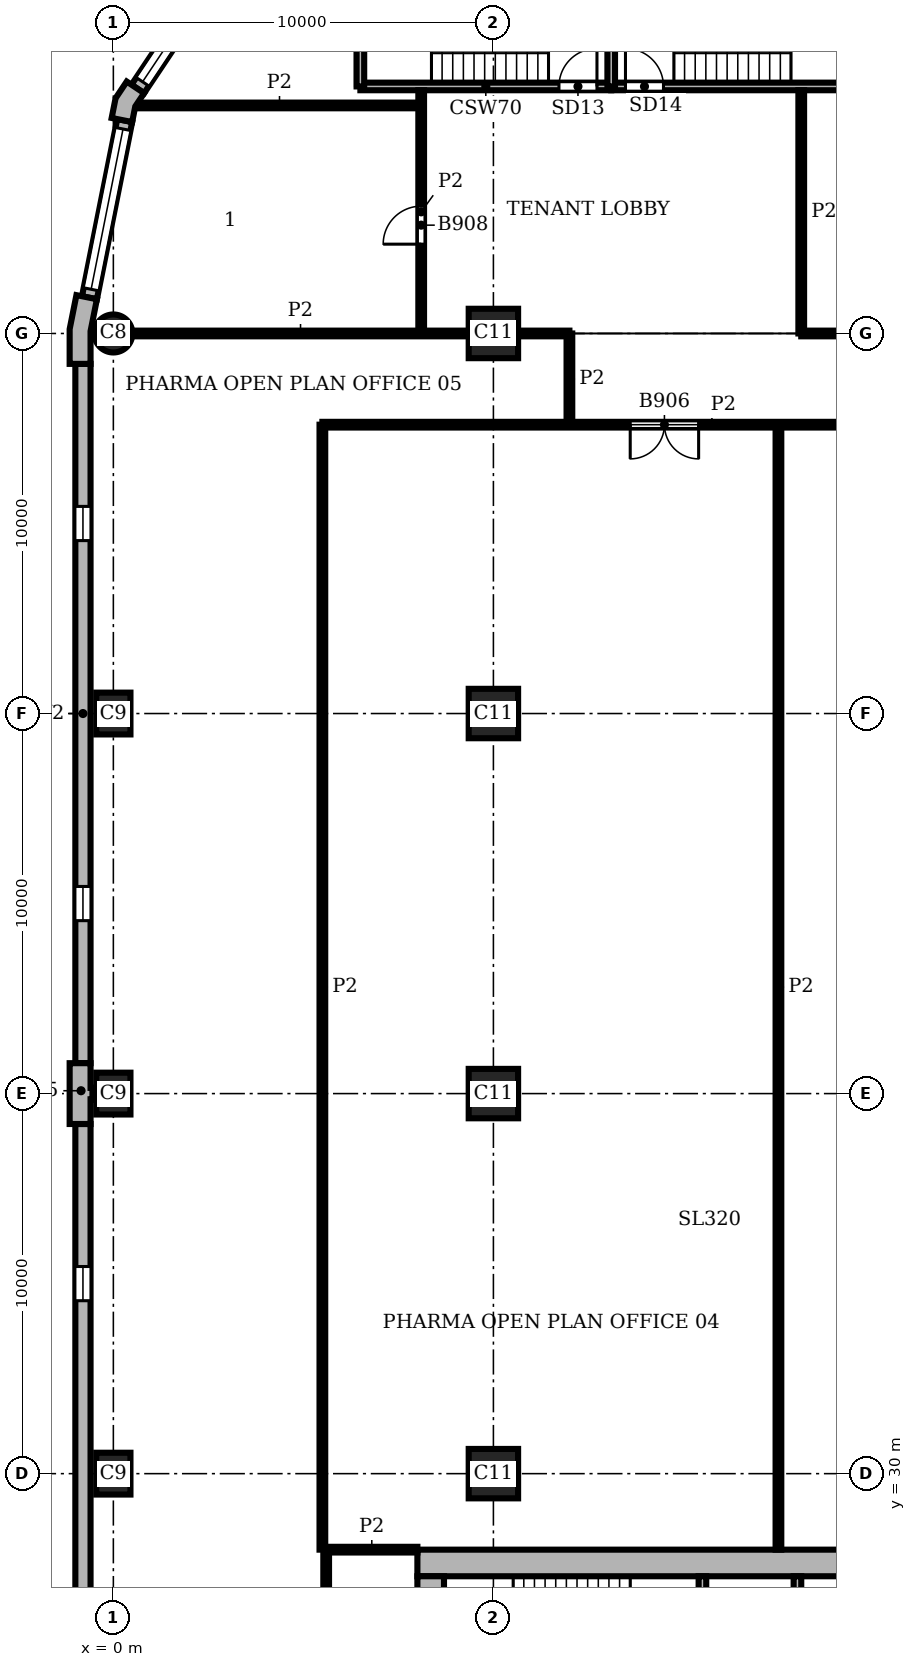
"""IFC4 building model, lengths in metres.
Left out: names, types, materials, properties, quantities, classifications, styles, units other than length and angle.
Written with IfcOpenShell. Run it as: python <this file> out.ifc"""

import sys

from ifc_helpers import new_model, si_unit, direction, frame, frame_2d, origin, origin_2d, place, context, subcontext, project, spatial, polyline, rectangle, circle, outline, extrude, element, fill, save


model = new_model("IFC4")
c1 = context("Model", 3, precision=1e-05, world=origin(), true_north=direction((0.0, 1.0)))
c2 = subcontext(c1, "Body", "Model", "MODEL_VIEW")
j1 = project(units=[si_unit("LENGTHUNIT", "METRE"), si_unit("PLANEANGLEUNIT", "RADIAN")], contexts=[c1])
p1 = place(None, origin())
s1 = spatial("IfcSite", under=j1, at=p1, CompositionType="ELEMENT")
p2 = place(p1, origin())
s2 = spatial("IfcBuilding", under=s1, at=p2, CompositionType="ELEMENT")
p3 = place(p2, frame((0.0, 0.0, 233.1)))
s3 = spatial("IfcBuildingStorey", under=s2, at=p3, CompositionType="ELEMENT", Elevation=233.1)
p4 = place(p3, frame((0.0, 60.0, 0.0), z_axis=(0.0, 0.0, 1.0), x_axis=(1.0, 0.0, 0.0)))
e1 = element("IfcColumn", 1, at=p4, inside=s3, PredefinedType="COLUMN", context=c2, shape_type="SweptSolid", body=[
    extrude(circle(Radius=0.5, at=origin_2d()), origin(), (0.0, 0.0, 1.0), 3.9),
])
for number, where, z_axis, x_axis in (
    (2, (0.0, 50.0, 0.0), (0.0, 0.0, 1.0), (0.0, 1.0, 0.0)),
    (3, (0.0, 40.0, 0.0), (0.0, 0.0, 1.0), (0.0, 1.0, 0.0)),
    (4, (0.0, 30.0, 0.0), (0.0, 0.0, 1.0), (0.0, 1.0, 0.0)),
):
    element("IfcColumn", number, at=place(p3, frame(where, z_axis=z_axis, x_axis=x_axis)), inside=s3, PredefinedType="COLUMN", context=c2, shape_type="SweptSolid", body=[
        extrude(rectangle(XDim=1.1, YDim=0.9, at=origin_2d()), origin(), (0.0, 0.0, 1.0), 3.9),
    ])
for number, where, z_axis, x_axis in (
    (5, (10.0, 30.0, 0.0), (0.0, 0.0, 1.0), (1.0, 0.0, 0.0)),
    (6, (10.0, 40.0, 0.0), (0.0, 0.0, 1.0), (1.0, 0.0, 0.0)),
    (7, (10.0, 50.0, 0.0), (0.0, 0.0, 1.0), (1.0, 0.0, 0.0)),
    (8, (10.0, 60.0, 0.0), (0.0, 0.0, 1.0), (1.0, 0.0, 0.0)),
):
    element("IfcColumn", number, at=place(p3, frame(where, z_axis=z_axis, x_axis=x_axis)), inside=s3, PredefinedType="COLUMN", context=c2, shape_type="SweptSolid", body=[
        extrude(rectangle(XDim=1.3, YDim=1.3, at=origin_2d()), origin(), (0.0, 0.0, 1.0), 3.9),
    ])
p5 = place(p3, frame((28.0, 27.65, 0.0), z_axis=(0.0, 0.0, 1.0), x_axis=(-1.0, 0.0, 0.0)))
e9 = element("IfcWall", 9, at=p5, inside=s3, PredefinedType="SHEAR", context=c2, shape_type="SweptSolid", body=[
    extrude(rectangle(XDim=20.0, YDim=0.7, at=frame_2d((10.0, 0.0))), origin(), (0.0, 0.0, 1.0), 3.9),
])
p6 = place(p3, frame((8.35, 27.3, 0.0), z_axis=(0.0, 0.0, 1.0), x_axis=(0.0, -1.0, 0.0)))
e10 = element("IfcWall", 10, at=p6, inside=s3, PredefinedType="SHEAR", context=c2, shape_type="SweptSolid", body=[
    extrude(rectangle(XDim=18.6, YDim=0.7, at=frame_2d((9.3, 0.0))), origin(), (0.0, 0.0, 1.0), 3.9),
])
p7 = place(p3, origin())
e11 = element("IfcWall", 11, at=p7, inside=s3, PredefinedType="SOLIDWALL", context=c2, shape_type="SweptSolid", body=[
    extrude(outline(polyline([(0.477, 66.545), (0.352, 66.629), (0.059, 66.189), (-0.045, 65.67), (0.103, 65.641), (0.495, 65.563), (0.577, 65.974), (0.81, 66.323), (0.477, 66.545)])), origin(), (0.0, 0.0, 1.0), 3.9),
])
e12 = element("IfcWall", 12, at=p7, inside=s3, PredefinedType="SOLIDWALL", context=c2, shape_type="SweptSolid", body=[
    extrude(outline(polyline([(-0.825, 60.98), (-0.972, 61.009), (-1.15, 60.113), (-1.15, 59.2), (-1.0, 59.2), (-0.6, 59.2), (-0.6, 60.059), (-0.432, 60.902), (-0.825, 60.98)])), origin(), (0.0, 0.0, 1.0), 3.9),
])
e13 = element("IfcWall", 13, at=p7, inside=s3, PredefinedType="SOLIDWALL", context=c2, shape_type="SweptSolid", body=[
    extrude(outline(polyline([(-0.6, 39.2), (-0.6, 39.85), (-0.55, 39.85), (-0.55, 40.15), (-0.6, 40.15), (-0.6, 40.8), (-1.0, 40.8), (-1.15, 40.8), (-1.15, 40.0), (-1.15, 39.2), (-1.0, 39.2), (-0.6, 39.2)])), origin(), (0.0, 0.0, 1.0), 3.9),
])
p8 = place(p3, frame((3.284, 70.386, 0.0), z_axis=(0.0, 0.0, 1.0), x_axis=(-0.555541552266, -0.831488775454, 0.0)))
e14 = element("IfcWall", 14, at=p8, inside=s3, PredefinedType="SOLIDWALL", context=c2, shape_type="SweptSolid", body=[
    extrude(rectangle(XDim=4.753, YDim=0.4, at=frame_2d((2.376, 0.0))), origin(), (0.0, 0.0, 1.0), 3.9),
])
p9 = place(p8, frame((0.226, 0.0, 0.9)))
e15 = element("IfcOpeningElement", 15, at=p9, cuts=e14, PredefinedType="OPENING", context=c2, shape_type="SweptSolid", body=[
    extrude(rectangle(XDim=4.3, YDim=2.35, at=frame_2d((2.15, 1.175))), frame((0.0, 0.21, 0.0), z_axis=(0.0, -1.0, 0.0), x_axis=(1.0, 0.0, 0.0)), (0.0, 0.0, 1.0), 0.42),
])
p10 = place(p3, frame((0.299, 65.602, 0.0), z_axis=(0.0, 0.0, 1.0), x_axis=(-0.195098533057, -0.98078364709, 0.0)))
e16 = element("IfcWall", 16, at=p10, inside=s3, PredefinedType="SOLIDWALL", context=c2, shape_type="SweptSolid", body=[
    extrude(rectangle(XDim=4.753, YDim=0.4, at=frame_2d((2.376, 0.0))), origin(), (0.0, 0.0, 1.0), 3.9),
])
p11 = place(p10, frame((0.226, 0.0, 0.9)))
e17 = element("IfcOpeningElement", 17, at=p11, cuts=e16, PredefinedType="OPENING", context=c2, shape_type="SweptSolid", body=[
    extrude(rectangle(XDim=4.3, YDim=2.35, at=frame_2d((2.15, 1.175))), frame((0.0, 0.21, 0.0), z_axis=(0.0, -1.0, 0.0), x_axis=(1.0, 0.0, 0.0)), (0.0, 0.0, 1.0), 0.42),
])
p12 = place(p3, frame((-0.8, 59.2, 0.0), z_axis=(0.0, 0.0, 1.0), x_axis=(0.0, -1.0, 0.0)))
e18 = element("IfcWall", 18, at=p12, inside=s3, PredefinedType="SOLIDWALL", context=c2, shape_type="SweptSolid", body=[
    extrude(rectangle(XDim=18.4, YDim=0.4, at=frame_2d((9.2, 0.0))), origin(), (0.0, 0.0, 1.0), 3.9),
])
p13 = place(p12, frame((3.75, 0.0, 0.9)))
e19 = element("IfcOpeningElement", 19, at=p13, cuts=e18, PredefinedType="OPENING", context=c2, shape_type="SweptSolid", body=[
    extrude(rectangle(XDim=0.9, YDim=2.35, at=frame_2d((0.45, 1.175))), frame((0.0, 0.21, 0.0), z_axis=(0.0, -1.0, 0.0), x_axis=(1.0, 0.0, 0.0)), (0.0, 0.0, 1.0), 0.42),
])
p14 = place(p12, frame((13.75, 0.0, 0.9)))
e20 = element("IfcOpeningElement", 20, at=p14, cuts=e18, PredefinedType="OPENING", context=c2, shape_type="SweptSolid", body=[
    extrude(rectangle(XDim=0.9, YDim=2.35, at=frame_2d((0.45, 1.175))), frame((0.0, 0.21, 0.0), z_axis=(0.0, -1.0, 0.0), x_axis=(1.0, 0.0, 0.0)), (0.0, 0.0, 1.0), 0.42),
])
p15 = place(p3, frame((-0.8, 39.2, 0.0), z_axis=(0.0, 0.0, 1.0), x_axis=(0.0, -1.0, 0.0)))
e21 = element("IfcWall", 21, at=p15, inside=s3, PredefinedType="SOLIDWALL", context=c2, shape_type="SweptSolid", body=[
    extrude(rectangle(XDim=18.4, YDim=0.4, at=frame_2d((9.2, 0.0))), origin(), (0.0, 0.0, 1.0), 3.9),
])
p16 = place(p15, frame((3.75, 0.0, 0.9)))
e22 = element("IfcOpeningElement", 22, at=p16, cuts=e21, PredefinedType="OPENING", context=c2, shape_type="SweptSolid", body=[
    extrude(rectangle(XDim=0.9, YDim=2.35, at=frame_2d((0.45, 1.175))), frame((0.0, 0.21, 0.0), z_axis=(0.0, -1.0, 0.0), x_axis=(1.0, 0.0, 0.0)), (0.0, 0.0, 1.0), 0.42),
])
p17 = place(p15, frame((13.75, 0.0, 0.9)))
e23 = element("IfcOpeningElement", 23, at=p17, cuts=e21, PredefinedType="OPENING", context=c2, shape_type="SweptSolid", body=[
    extrude(rectangle(XDim=0.9, YDim=2.35, at=frame_2d((0.45, 1.175))), frame((0.0, 0.21, 0.0), z_axis=(0.0, -1.0, 0.0), x_axis=(1.0, 0.0, 0.0)), (0.0, 0.0, 1.0), 0.42),
])
p18 = place(p3, frame((6.5, 66.5, 0.0), z_axis=(0.0, 0.0, 1.0), x_axis=(1.0, 0.0, 0.0)))
e24 = element("IfcWall", 24, at=p18, inside=s3, PredefinedType="SHEAR", context=c2, shape_type="SweptSolid", body=[
    extrude(rectangle(XDim=6.6, YDim=0.2, at=frame_2d((3.3, 0.0))), origin(), (0.0, 0.0, 1.0), 3.45),
])
p19 = place(p18, frame((5.225, 0.0, 0.0)))
e25 = element("IfcOpeningElement", 25, at=p19, cuts=e24, PredefinedType="OPENING", context=c2, shape_type="SweptSolid", body=[
    extrude(rectangle(XDim=1.0, YDim=2.1, at=frame_2d((0.5, 1.05))), frame((0.0, 0.11, 0.0), z_axis=(0.0, -1.0, 0.0), x_axis=(1.0, 0.0, 0.0)), (0.0, 0.0, 1.0), 0.22),
])
p20 = place(p3, frame((13.1, 66.5, 0.0), z_axis=(0.0, 0.0, 1.0), x_axis=(1.0, 0.0, 0.0)))
e26 = element("IfcWall", 26, at=p20, inside=s3, PredefinedType="SHEAR", context=c2, shape_type="SweptSolid", body=[
    extrude(rectangle(XDim=6.6, YDim=0.2, at=frame_2d((3.3, 0.0))), origin(), (0.0, 0.0, 1.0), 3.45),
])
p21 = place(p20, frame((0.375, 0.0, 0.0)))
e27 = element("IfcOpeningElement", 27, at=p21, cuts=e26, PredefinedType="OPENING", context=c2, shape_type="SweptSolid", body=[
    extrude(rectangle(XDim=1.0, YDim=2.1, at=frame_2d((0.5, 1.05))), frame((0.0, 0.11, 0.0), z_axis=(0.0, -1.0, 0.0), x_axis=(1.0, 0.0, 0.0)), (0.0, 0.0, 1.0), 0.22),
])
for number, where, z_axis, x_axis in (
    (28, (6.5, 66.5, 0.0), (0.0, 0.0, 1.0), (0.0, 1.0, 0.0)),
    (29, (13.1, 66.5, 0.0), (0.0, 0.0, 1.0), (0.0, 1.0, 0.0)),
):
    element("IfcWall", number, at=place(p3, frame(where, z_axis=z_axis, x_axis=x_axis)), inside=s3, PredefinedType="SHEAR", context=c2, shape_type="SweptSolid", body=[
        extrude(rectangle(XDim=3.3, YDim=0.2, at=frame_2d((1.65, 0.0))), origin(), (0.0, 0.0, 1.0), 3.45),
    ])
p22 = place(p3, frame((15.5, 23.6, 0.0), z_axis=(0.0, 0.0, 1.0), x_axis=(0.0, 1.0, 0.0)))
e30 = element("IfcWall", 30, at=p22, inside=s3, PredefinedType="SHEAR", context=c2, shape_type="SweptSolid", body=[
    extrude(rectangle(XDim=3.7, YDim=0.2, at=frame_2d((1.85, 0.0))), origin(), (0.0, 0.0, 1.0), 3.45),
])
p23 = place(p3, frame((18.0, 20.0, 0.0), z_axis=(0.0, 0.0, 1.0), x_axis=(0.0, 1.0, 0.0)))
e31 = element("IfcWall", 31, at=p23, inside=s3, PredefinedType="SHEAR", context=c2, shape_type="SweptSolid", body=[
    extrude(rectangle(XDim=7.3, YDim=0.2, at=frame_2d((3.65, 0.0))), origin(), (0.0, 0.0, 1.0), 3.45),
])
p24 = place(p23, frame((1.2, 0.0, 0.0)))
e32 = element("IfcOpeningElement", 32, at=p24, cuts=e31, PredefinedType="OPENING", context=c2, shape_type="SweptSolid", body=[
    extrude(rectangle(XDim=1.2, YDim=2.1, at=frame_2d((0.6, 1.05))), frame((0.0, 0.11, 0.0), z_axis=(0.0, -1.0, 0.0), x_axis=(1.0, 0.0, 0.0)), (0.0, 0.0, 1.0), 0.22),
])
p25 = place(p3, frame((5.5, 28.0, 0.0), z_axis=(0.0, 0.0, 1.0), x_axis=(0.0, 1.0, 0.0)))
e33 = element("IfcWall", 33, at=p25, inside=s3, PredefinedType="PARTITIONING", context=c2, shape_type="SweptSolid", body=[
    extrude(rectangle(XDim=29.6, YDim=0.15, at=frame_2d((14.8, 0.0))), origin(), (0.0, 0.0, 1.0), 3.45),
])
p26 = place(p3, frame((5.6, 5.6, 0.0), z_axis=(0.0, 0.0, 1.0), x_axis=(0.0, 1.0, 0.0)))
e34 = element("IfcWall", 34, at=p26, inside=s3, PredefinedType="PARTITIONING", context=c2, shape_type="SweptSolid", body=[
    extrude(rectangle(XDim=22.4, YDim=0.15, at=frame_2d((11.2, 0.0))), origin(), (0.0, 0.0, 1.0), 3.45),
])
p27 = place(p26, frame((5.35, 0.0, 0.0)))
e35 = element("IfcOpeningElement", 35, at=p27, cuts=e34, PredefinedType="OPENING", context=c2, shape_type="SweptSolid", body=[
    extrude(rectangle(XDim=0.8, YDim=2.1, at=frame_2d((0.4, 1.05))), frame((0.0, 0.085, 0.0), z_axis=(0.0, -1.0, 0.0), x_axis=(1.0, 0.0, 0.0)), (0.0, 0.0, 1.0), 0.17),
])
p28 = place(p26, frame((11.5, 0.0, 0.0)))
e36 = element("IfcOpeningElement", 36, at=p28, cuts=e34, PredefinedType="OPENING", context=c2, shape_type="SweptSolid", body=[
    extrude(rectangle(XDim=0.8, YDim=2.1, at=frame_2d((0.4, 1.05))), frame((0.0, 0.085, 0.0), z_axis=(0.0, -1.0, 0.0), x_axis=(1.0, 0.0, 0.0)), (0.0, 0.0, 1.0), 0.17),
])
p29 = place(p26, frame((17.75, 0.0, 0.0)))
e37 = element("IfcOpeningElement", 37, at=p29, cuts=e34, PredefinedType="OPENING", context=c2, shape_type="SweptSolid", body=[
    extrude(rectangle(XDim=1.8, YDim=2.1, at=frame_2d((0.9, 1.05))), frame((0.0, 0.085, 0.0), z_axis=(0.0, -1.0, 0.0), x_axis=(1.0, 0.0, 0.0)), (0.0, 0.0, 1.0), 0.17),
])
p30 = place(p3, frame((8.1, 60.0, 0.0), z_axis=(0.0, 0.0, 1.0), x_axis=(0.0, 1.0, 0.0)))
e38 = element("IfcWall", 38, at=p30, inside=s3, PredefinedType="PARTITIONING", context=c2, shape_type="SweptSolid", body=[
    extrude(rectangle(XDim=6.4, YDim=0.15, at=frame_2d((3.2, 0.0))), origin(), (0.0, 0.0, 1.0), 3.45),
])
p31 = place(p30, frame((2.35, 0.0, 0.0)))
e39 = element("IfcOpeningElement", 39, at=p31, cuts=e38, PredefinedType="OPENING", context=c2, shape_type="SweptSolid", body=[
    extrude(rectangle(XDim=1.0, YDim=2.1, at=frame_2d((0.5, 1.05))), frame((0.0, 0.085, 0.0), z_axis=(0.0, -1.0, 0.0), x_axis=(1.0, 0.0, 0.0)), (0.0, 0.0, 1.0), 0.17),
])
p32 = place(p3, frame((12.0, 57.6, 0.0), z_axis=(0.0, 0.0, 1.0), x_axis=(0.0, 1.0, 0.0)))
e40 = element("IfcWall", 40, at=p32, inside=s3, PredefinedType="PARTITIONING", context=c2, shape_type="SweptSolid", body=[
    extrude(rectangle(XDim=2.4, YDim=0.15, at=frame_2d((1.2, 0.0))), origin(), (0.0, 0.0, 1.0), 3.45),
])
p33 = place(p3, frame((17.5, 28.0, 0.0), z_axis=(0.0, 0.0, 1.0), x_axis=(0.0, 1.0, 0.0)))
e41 = element("IfcWall", 41, at=p33, inside=s3, PredefinedType="PARTITIONING", context=c2, shape_type="SweptSolid", body=[
    extrude(rectangle(XDim=29.6, YDim=0.15, at=frame_2d((14.8, 0.0))), origin(), (0.0, 0.0, 1.0), 3.45),
])
p34 = place(p3, frame((18.1, 60.0, 0.0), z_axis=(0.0, 0.0, 1.0), x_axis=(0.0, 1.0, 0.0)))
e42 = element("IfcWall", 42, at=p34, inside=s3, PredefinedType="PARTITIONING", context=c2, shape_type="SweptSolid", body=[
    extrude(rectangle(XDim=6.4, YDim=0.15, at=frame_2d((3.2, 0.0))), origin(), (0.0, 0.0, 1.0), 3.45),
])
p35 = place(p3, frame((5.6, 28.0, 0.0), z_axis=(0.0, 0.0, 1.0), x_axis=(1.0, 0.0, 0.0)))
e43 = element("IfcWall", 43, at=p35, inside=s3, PredefinedType="PARTITIONING", context=c2, shape_type="SweptSolid", body=[
    extrude(rectangle(XDim=2.4, YDim=0.15, at=frame_2d((1.2, 0.0))), origin(), (0.0, 0.0, 1.0), 3.45),
])
p36 = place(p3, frame((5.5, 57.6, 0.0), z_axis=(0.0, 0.0, 1.0), x_axis=(1.0, 0.0, 0.0)))
e44 = element("IfcWall", 44, at=p36, inside=s3, PredefinedType="PARTITIONING", context=c2, shape_type="SweptSolid", body=[
    extrude(rectangle(XDim=20.5, YDim=0.15, at=frame_2d((10.25, 0.0))), origin(), (0.0, 0.0, 1.0), 3.45),
])
p37 = place(p36, frame((8.1, 0.0, 0.0)))
e45 = element("IfcOpeningElement", 45, at=p37, cuts=e44, PredefinedType="OPENING", context=c2, shape_type="SweptSolid", body=[
    extrude(rectangle(XDim=1.8, YDim=2.1, at=frame_2d((0.9, 1.05))), frame((0.0, 0.085, 0.0), z_axis=(0.0, -1.0, 0.0), x_axis=(1.0, 0.0, 0.0)), (0.0, 0.0, 1.0), 0.17),
])
p38 = place(p3, frame((0.5, 60.0, 0.0), z_axis=(0.0, 0.0, 1.0), x_axis=(1.0, 0.0, 0.0)))
e46 = element("IfcWall", 46, at=p38, inside=s3, PredefinedType="PARTITIONING", context=c2, shape_type="SweptSolid", body=[
    extrude(rectangle(XDim=8.85, YDim=0.15, at=frame_2d((4.425, 0.0))), origin(), (0.0, 0.0, 1.0), 3.45),
])
p39 = place(p3, frame((10.65, 60.0, 0.0), z_axis=(0.0, 0.0, 1.0), x_axis=(1.0, 0.0, 0.0)))
e47 = element("IfcWall", 47, at=p39, inside=s3, PredefinedType="PARTITIONING", context=c2, shape_type="SweptSolid", body=[
    extrude(rectangle(XDim=1.35, YDim=0.15, at=frame_2d((0.675, 0.0))), origin(), (0.0, 0.0, 1.0), 3.45),
])
p40 = place(p3, frame((18.1, 60.0, 0.0), z_axis=(0.0, 0.0, 1.0), x_axis=(1.0, 0.0, 0.0)))
e48 = element("IfcWall", 48, at=p40, inside=s3, PredefinedType="PARTITIONING", context=c2, shape_type="SweptSolid", body=[
    extrude(rectangle(XDim=1.25, YDim=0.15, at=frame_2d((0.625, 0.0))), origin(), (0.0, 0.0, 1.0), 3.45),
])
p41 = place(p3, frame((0.644, 66.0, 0.0), z_axis=(0.0, 0.0, 1.0), x_axis=(1.0, 0.0, 0.0)))
e49 = element("IfcWall", 49, at=p41, inside=s3, PredefinedType="PARTITIONING", context=c2, shape_type="SweptSolid", body=[
    extrude(rectangle(XDim=7.456, YDim=0.15, at=frame_2d((3.728, 0.0))), origin(), (0.0, 0.0, 1.0), 3.45),
])
p42 = place(p9, origin())
e50 = element("IfcWindow", 50, at=p42, inside=s3, PartitioningType="SINGLE_PANEL", PredefinedType="WINDOW", context=c2, shape_type="SweptSolid", body=[
    extrude(rectangle(XDim=4.3, YDim=2.35, at=frame_2d((2.15, 1.175))), frame((0.0, 0.16, 0.0), z_axis=(0.0, -1.0, 0.0), x_axis=(1.0, 0.0, 0.0)), (0.0, 0.0, 1.0), 0.06),
])
fill(e15, e50)
p43 = place(p11, origin())
e51 = element("IfcWindow", 51, at=p43, inside=s3, PartitioningType="SINGLE_PANEL", PredefinedType="WINDOW", context=c2, shape_type="SweptSolid", body=[
    extrude(rectangle(XDim=4.3, YDim=2.35, at=frame_2d((2.15, 1.175))), frame((0.0, 0.16, 0.0), z_axis=(0.0, -1.0, 0.0), x_axis=(1.0, 0.0, 0.0)), (0.0, 0.0, 1.0), 0.06),
])
fill(e17, e51)
p44 = place(p13, origin())
e52 = element("IfcWindow", 52, at=p44, inside=s3, PartitioningType="SINGLE_PANEL", PredefinedType="WINDOW", context=c2, shape_type="SweptSolid", body=[
    extrude(rectangle(XDim=0.9, YDim=2.35, at=frame_2d((0.45, 1.175))), frame((0.0, 0.16, 0.0), z_axis=(0.0, -1.0, 0.0), x_axis=(1.0, 0.0, 0.0)), (0.0, 0.0, 1.0), 0.06),
])
fill(e19, e52)
p45 = place(p14, origin())
e53 = element("IfcWindow", 53, at=p45, inside=s3, PartitioningType="SINGLE_PANEL", PredefinedType="WINDOW", context=c2, shape_type="SweptSolid", body=[
    extrude(rectangle(XDim=0.9, YDim=2.35, at=frame_2d((0.45, 1.175))), frame((0.0, 0.16, 0.0), z_axis=(0.0, -1.0, 0.0), x_axis=(1.0, 0.0, 0.0)), (0.0, 0.0, 1.0), 0.06),
])
fill(e20, e53)
p46 = place(p16, origin())
e54 = element("IfcWindow", 54, at=p46, inside=s3, PartitioningType="SINGLE_PANEL", PredefinedType="WINDOW", context=c2, shape_type="SweptSolid", body=[
    extrude(rectangle(XDim=0.9, YDim=2.35, at=frame_2d((0.45, 1.175))), frame((0.0, 0.16, 0.0), z_axis=(0.0, -1.0, 0.0), x_axis=(1.0, 0.0, 0.0)), (0.0, 0.0, 1.0), 0.06),
])
fill(e22, e54)
p47 = place(p19, origin())
e55 = element("IfcDoor", 55, at=p47, inside=s3, OperationType="SINGLE_SWING_RIGHT", PredefinedType="DOOR", context=c2, shape_type="SweptSolid", body=[
    extrude(rectangle(XDim=1.0, YDim=2.1, at=frame_2d((0.5, 1.05))), frame((0.0, 0.025, 0.0), z_axis=(0.0, -1.0, 0.0), x_axis=(1.0, 0.0, 0.0)), (0.0, 0.0, 1.0), 0.05),
])
fill(e25, e55)
p48 = place(p21, origin())
e56 = element("IfcDoor", 56, at=p48, inside=s3, OperationType="SINGLE_SWING_LEFT", PredefinedType="DOOR", context=c2, shape_type="SweptSolid", body=[
    extrude(rectangle(XDim=1.0, YDim=2.1, at=frame_2d((0.5, 1.05))), frame((0.0, 0.025, 0.0), z_axis=(0.0, -1.0, 0.0), x_axis=(1.0, 0.0, 0.0)), (0.0, 0.0, 1.0), 0.05),
])
fill(e27, e56)
p49 = place(p37, frame((1.8, 0.0, 0.0), z_axis=(0.0, 0.0, 1.0), x_axis=(-1.0, 0.0, 0.0)))
e57 = element("IfcDoor", 57, at=p49, inside=s3, OperationType="DOUBLE_DOOR_SINGLE_SWING", PredefinedType="DOOR", context=c2, shape_type="SweptSolid", body=[
    extrude(rectangle(XDim=1.8, YDim=2.1, at=frame_2d((0.9, 1.05))), frame((0.0, 0.025, 0.0), z_axis=(0.0, -1.0, 0.0), x_axis=(1.0, 0.0, 0.0)), (0.0, 0.0, 1.0), 0.05),
])
fill(e45, e57)
p50 = place(p31, origin())
e58 = element("IfcDoor", 58, at=p50, inside=s3, OperationType="SINGLE_SWING_LEFT", PredefinedType="DOOR", context=c2, shape_type="SweptSolid", body=[
    extrude(rectangle(XDim=1.0, YDim=2.1, at=frame_2d((0.5, 1.05))), frame((0.0, 0.025, 0.0), z_axis=(0.0, -1.0, 0.0), x_axis=(1.0, 0.0, 0.0)), (0.0, 0.0, 1.0), 0.05),
])
fill(e39, e58)
save(model, sys.argv[1])
